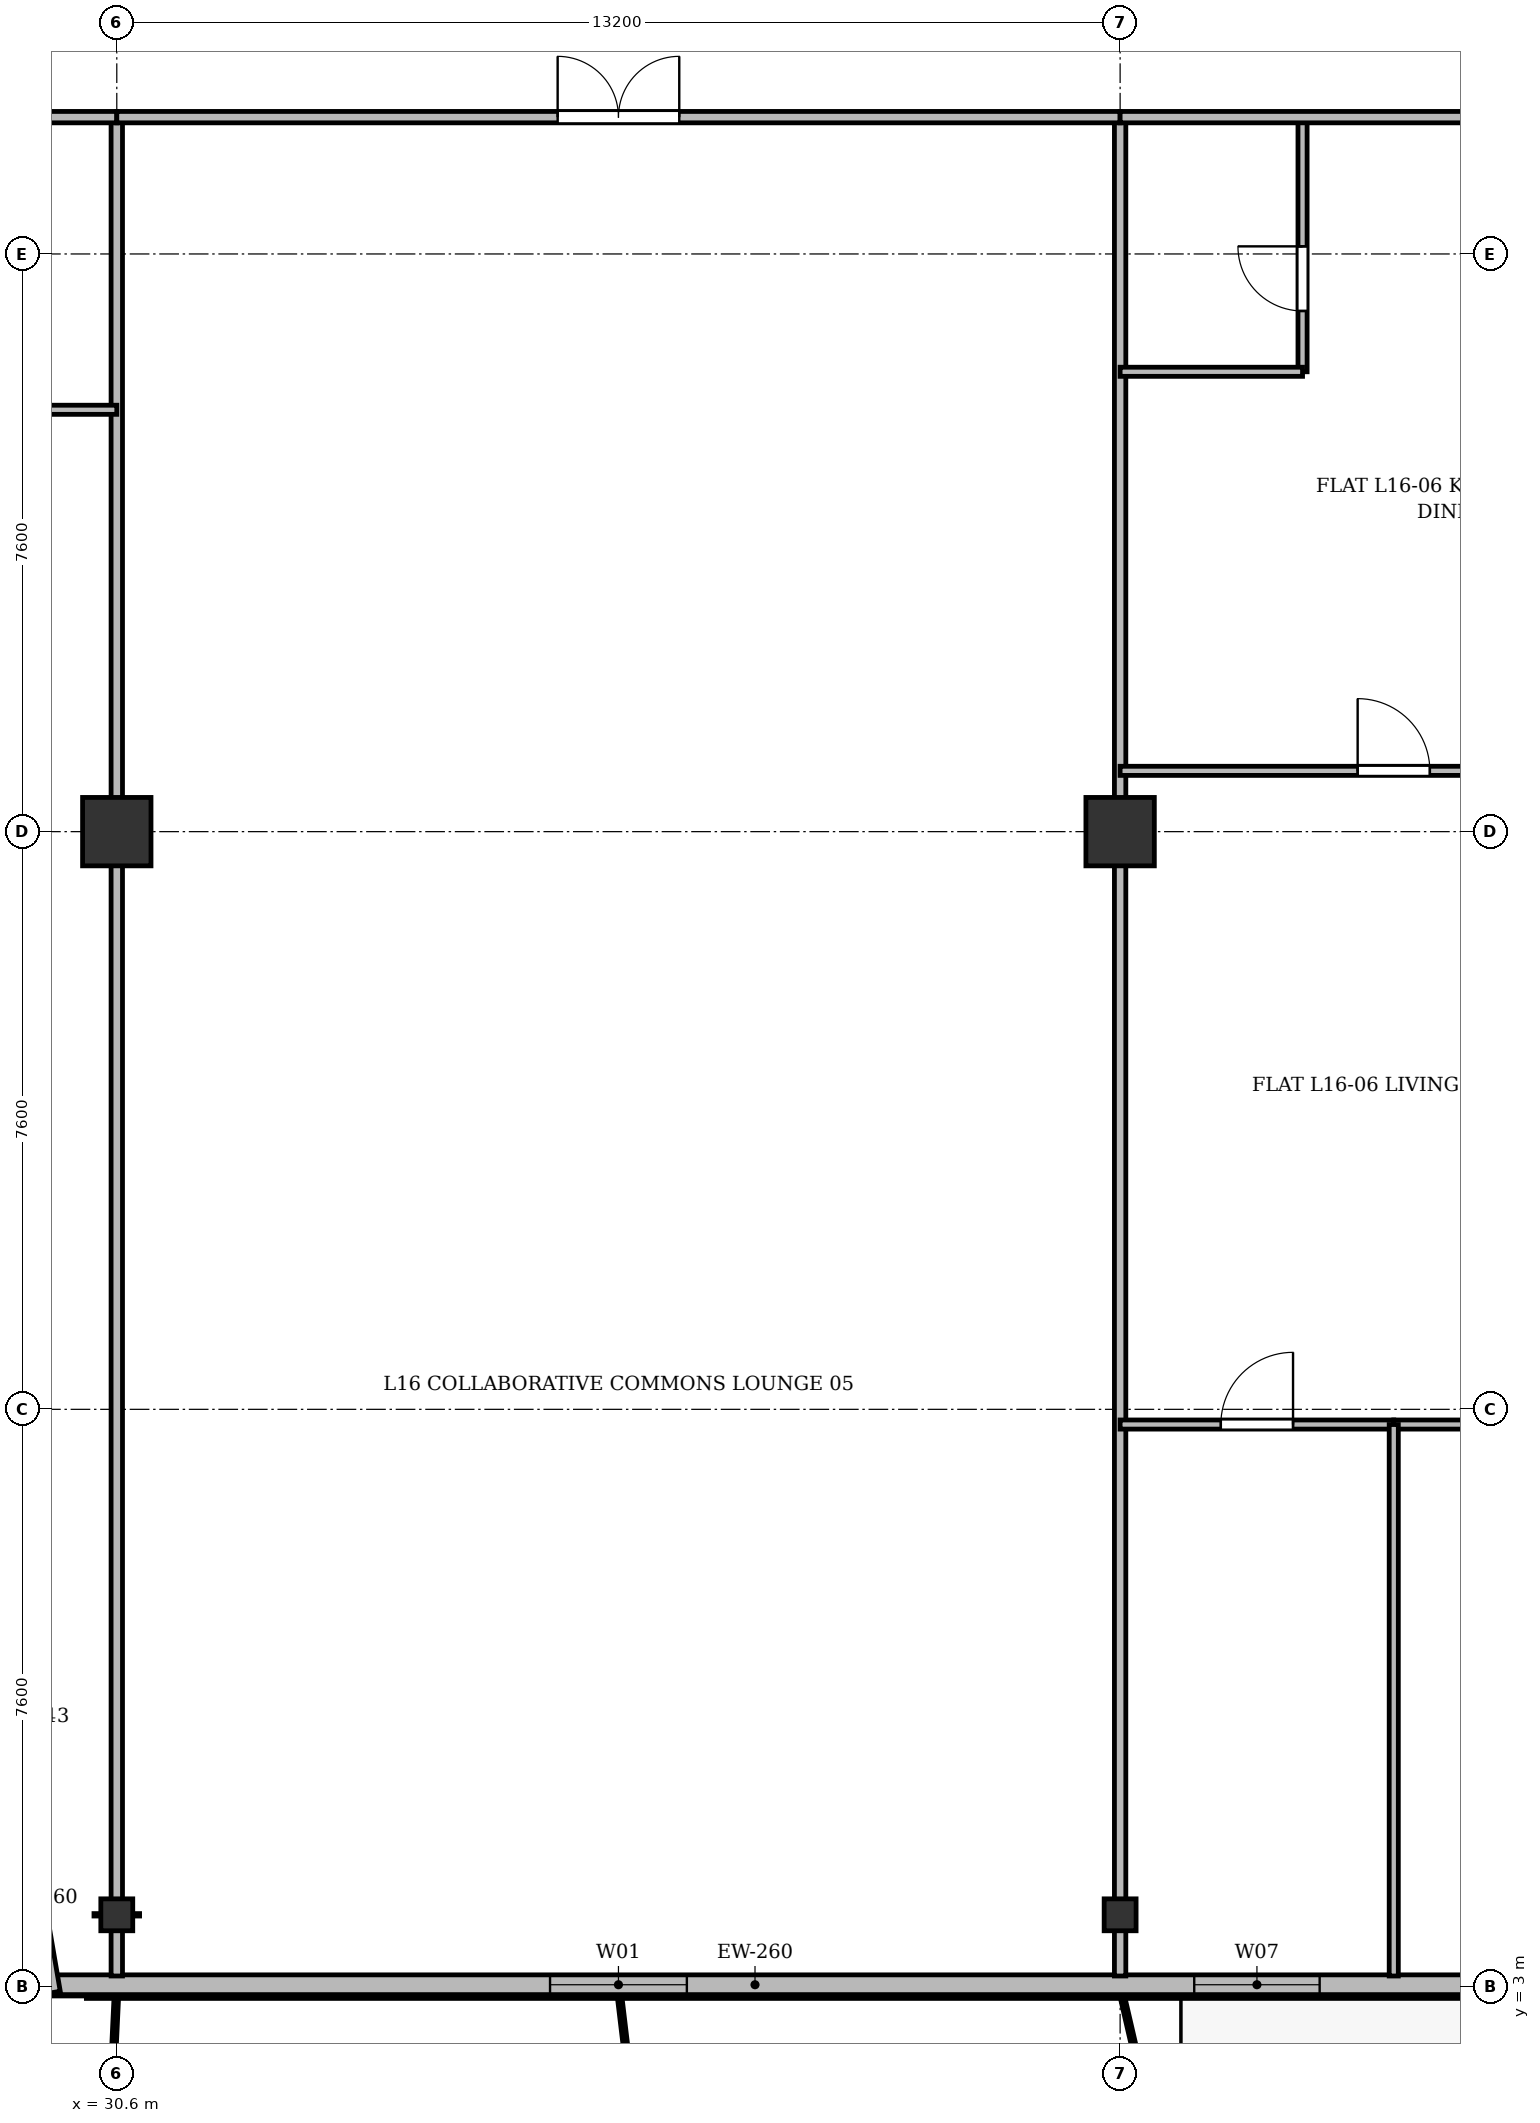
"""IFC4 building model, lengths in metres.
Left out: names, types, materials, properties, quantities, classifications, styles, units other than length and angle.
Written with IfcOpenShell. Run it as: python <this file> out.ifc"""

import sys

from ifc_helpers import new_model, si_unit, direction, frame, frame_2d, origin, origin_2d, place, context, subcontext, project, spatial, rectangle, i_section, extrude, source, transform, mapped, element, fill, save


model = new_model("IFC4")
c1 = context("Model", 3, precision=1e-05, world=origin(), true_north=direction((0.0, 1.0)))
c2 = subcontext(c1, "Body", "Model", "MODEL_VIEW")
j1 = project(units=[si_unit("LENGTHUNIT", "METRE"), si_unit("PLANEANGLEUNIT", "RADIAN")], contexts=[c1])
p1 = place(None, origin())
s1 = spatial("IfcSite", under=j1, at=p1, CompositionType="ELEMENT")
p2 = place(p1, origin())
s2 = spatial("IfcBuilding", under=s1, at=p2, CompositionType="ELEMENT")
p3 = place(p2, frame((0.0, 0.0, 63.1)))
s3 = spatial("IfcBuildingStorey", under=s2, at=p3, CompositionType="ELEMENT", Elevation=63.1)
m1 = source(origin(), c2, "Body", "SweptSolid", [
    extrude(i_section(OverallWidth=0.42, OverallDepth=0.42, WebThickness=0.026, FlangeThickness=0.04, at=origin_2d()), origin(), (0.0, 0.0, 1.0), 3.6),
])
p4 = place(p3, frame((30.6, 3.95, 0.0), z_axis=(0.0, 0.0, 1.0), x_axis=(1.0, 0.0, 0.0)))
e1 = element("IfcColumn", 1, at=p4, inside=s3, PredefinedType="COLUMN", context=c2, shape_type="MappedRepresentation", body=[
    mapped(m1, transform((0.0, 0.0, 0.0), x_axis=(1.0, 0.0, 0.0), y_axis=(0.0, 1.0, 0.0), z_axis=(0.0, 0.0, 1.0), scale=1.0)),
])
m2 = source(origin(), c2, "Body", "SweptSolid", [
    extrude(rectangle(XDim=0.9, YDim=0.9, at=origin_2d()), origin(), (0.0, 0.0, 1.0), 3.6),
])
p5 = place(p3, frame((30.6, 18.2, 0.0), z_axis=(0.0, 0.0, 1.0), x_axis=(1.0, 0.0, 0.0)))
e2 = element("IfcColumn", 2, at=p5, inside=s3, PredefinedType="COLUMN", context=c2, shape_type="MappedRepresentation", body=[
    mapped(m2, transform((0.0, 0.0, 0.0), x_axis=(1.0, 0.0, 0.0), y_axis=(0.0, 1.0, 0.0), z_axis=(0.0, 0.0, 1.0), scale=1.0)),
])
p6 = place(p3, frame((43.8, 3.95, 0.0), z_axis=(0.0, 0.0, 1.0), x_axis=(1.0, 0.0, 0.0)))
e3 = element("IfcColumn", 3, at=p6, inside=s3, PredefinedType="COLUMN", context=c2, shape_type="MappedRepresentation", body=[
    mapped(m1, transform((0.0, 0.0, 0.0), x_axis=(1.0, 0.0, 0.0), y_axis=(0.0, 1.0, 0.0), z_axis=(0.0, 0.0, 1.0), scale=1.0)),
])
p7 = place(p3, frame((43.8, 18.2, 0.0), z_axis=(0.0, 0.0, 1.0), x_axis=(1.0, 0.0, 0.0)))
e4 = element("IfcColumn", 4, at=p7, inside=s3, PredefinedType="COLUMN", context=c2, shape_type="MappedRepresentation", body=[
    mapped(m2, transform((0.0, 0.0, 0.0), x_axis=(1.0, 0.0, 0.0), y_axis=(0.0, 1.0, 0.0), z_axis=(0.0, 0.0, 1.0), scale=1.0)),
])
p8 = place(p3, frame((66.9, 3.03, 0.0), z_axis=(0.0, 0.0, 1.0), x_axis=(-1.0, 0.0, 0.0)))
e5 = element("IfcWall", 5, at=p8, inside=s3, PredefinedType="SOLIDWALL", context=c2, shape_type="SweptSolid", body=[
    extrude(rectangle(XDim=37.3, YDim=0.26, at=frame_2d((18.65, 0.0))), origin(), (0.0, 0.0, 1.0), 3.34),
])
p9 = place(p8, frame((2.995, 0.0, 0.9)))
e6 = element("IfcOpeningElement", 6, at=p9, cuts=e5, PredefinedType="OPENING", context=c2, shape_type="SweptSolid", body=[
    extrude(rectangle(XDim=2.2, YDim=1.8, at=frame_2d((1.1, 0.9))), frame((0.0, 0.14, 0.0), z_axis=(0.0, -1.0, 0.0), x_axis=(1.0, 0.0, 0.0)), (0.0, 0.0, 1.0), 0.28),
])
p10 = place(p8, frame((11.25, 0.0, 0.9)))
e7 = element("IfcOpeningElement", 7, at=p10, cuts=e5, PredefinedType="OPENING", context=c2, shape_type="SweptSolid", body=[
    extrude(rectangle(XDim=1.5, YDim=1.75, at=frame_2d((0.75, 0.875))), frame((0.0, 0.14, 0.0), z_axis=(0.0, -1.0, 0.0), x_axis=(1.0, 0.0, 0.0)), (0.0, 0.0, 1.0), 0.28),
])
p11 = place(p8, frame((17.007, 0.0, 0.0)))
e8 = element("IfcOpeningElement", 8, at=p11, cuts=e5, PredefinedType="OPENING", context=c2, shape_type="SweptSolid", body=[
    extrude(rectangle(XDim=1.2, YDim=2.2, at=frame_2d((0.6, 1.1))), frame((0.0, 0.14, 0.0), z_axis=(0.0, -1.0, 0.0), x_axis=(1.0, 0.0, 0.0)), (0.0, 0.0, 1.0), 0.28),
])
p12 = place(p8, frame((20.475, 0.0, 0.9)))
e9 = element("IfcOpeningElement", 9, at=p12, cuts=e5, PredefinedType="OPENING", context=c2, shape_type="SweptSolid", body=[
    extrude(rectangle(XDim=1.65, YDim=1.85, at=frame_2d((0.825, 0.925))), frame((0.0, 0.14, 0.0), z_axis=(0.0, -1.0, 0.0), x_axis=(1.0, 0.0, 0.0)), (0.0, 0.0, 1.0), 0.28),
])
p13 = place(p8, frame((28.8, 0.0, 0.9)))
e10 = element("IfcOpeningElement", 10, at=p13, cuts=e5, PredefinedType="OPENING", context=c2, shape_type="SweptSolid", body=[
    extrude(rectangle(XDim=1.8, YDim=1.8, at=frame_2d((0.9, 0.9))), frame((0.0, 0.14, 0.0), z_axis=(0.0, -1.0, 0.0), x_axis=(1.0, 0.0, 0.0)), (0.0, 0.0, 1.0), 0.28),
])
p14 = place(p3, frame((29.728, 2.922, 0.0), z_axis=(0.0, 0.0, 1.0), x_axis=(-0.168923741424, 0.98562912375, 0.0)))
e11 = element("IfcWall", 11, at=p14, inside=s3, PredefinedType="SOLIDWALL", context=c2, shape_type="SweptSolid", body=[
    extrude(rectangle(XDim=3.551, YDim=0.26, at=frame_2d((1.775, 0.0))), origin(), (0.0, 0.0, 1.0), 2.69),
])
p15 = place(p14, frame((1.971, 0.0, 0.0)))
e12 = element("IfcOpeningElement", 12, at=p15, cuts=e11, PredefinedType="OPENING", context=c2, shape_type="SweptSolid", body=[
    extrude(rectangle(XDim=1.2, YDim=2.2, at=frame_2d((0.6, 1.1))), frame((0.0, 0.14, 0.0), z_axis=(0.0, -1.0, 0.0), x_axis=(1.0, 0.0, 0.0)), (0.0, 0.0, 1.0), 0.28),
])
for number, where, z_axis, x_axis in (
    (13, (30.6, 3.145, 0.0), (0.0, 0.0, 1.0), (0.0, 1.0, 0.0)),
    (14, (43.8, 3.145, 0.0), (0.0, 0.0, 1.0), (0.0, 1.0, 0.0)),
):
    element("IfcWall", number, at=place(p3, frame(where, z_axis=z_axis, x_axis=x_axis)), inside=s3, PredefinedType="PARTITIONING", context=c2, shape_type="SweptSolid", body=[
        extrude(rectangle(XDim=24.455, YDim=0.15, at=frame_2d((12.228, 0.0))), origin(), (0.0, 0.0, 1.0), 2.752),
    ])
p16 = place(p3, frame((23.4, 27.6, 0.0), z_axis=(0.0, 0.0, 1.0), x_axis=(1.0, 0.0, 0.0)))
e15 = element("IfcWall", 15, at=p16, inside=s3, PredefinedType="PARTITIONING", context=c2, shape_type="SweptSolid", body=[
    extrude(rectangle(XDim=7.2, YDim=0.15, at=frame_2d((3.6, 0.0))), origin(), (0.0, 0.0, 1.0), 2.752),
])
p17 = place(p16, frame((3.125, 0.0, 0.0)))
e16 = element("IfcOpeningElement", 16, at=p17, cuts=e15, PredefinedType="OPENING", context=c2, shape_type="SweptSolid", body=[
    extrude(rectangle(XDim=0.95, YDim=2.15, at=frame_2d((0.475, 1.075))), frame((0.0, 0.085, 0.0), z_axis=(0.0, -1.0, 0.0), x_axis=(1.0, 0.0, 0.0)), (0.0, 0.0, 1.0), 0.17),
])
p18 = place(p3, frame((23.4, 23.75, 0.0), z_axis=(0.0, 0.0, 1.0), x_axis=(1.0, 0.0, 0.0)))
e17 = element("IfcWall", 17, at=p18, inside=s3, PredefinedType="PARTITIONING", context=c2, shape_type="SweptSolid", body=[
    extrude(rectangle(XDim=7.2, YDim=0.12, at=frame_2d((3.6, 0.0))), origin(), (0.0, 0.0, 1.0), 2.752),
])
p19 = place(p18, frame((3.125, 0.0, 0.0)))
e18 = element("IfcOpeningElement", 18, at=p19, cuts=e17, PredefinedType="OPENING", context=c2, shape_type="SweptSolid", body=[
    extrude(rectangle(XDim=0.95, YDim=2.15, at=frame_2d((0.475, 1.075))), frame((0.0, 0.07, 0.0), z_axis=(0.0, -1.0, 0.0), x_axis=(1.0, 0.0, 0.0)), (0.0, 0.0, 1.0), 0.14),
])
p20 = place(p3, frame((30.6, 27.6, 0.0), z_axis=(0.0, 0.0, 1.0), x_axis=(1.0, 0.0, 0.0)))
e19 = element("IfcWall", 19, at=p20, inside=s3, PredefinedType="PARTITIONING", context=c2, shape_type="SweptSolid", body=[
    extrude(rectangle(XDim=13.2, YDim=0.15, at=frame_2d((6.6, 0.0))), origin(), (0.0, 0.0, 1.0), 2.752),
])
p21 = place(p20, frame((5.8, 0.0, 0.0)))
e20 = element("IfcOpeningElement", 20, at=p21, cuts=e19, PredefinedType="OPENING", context=c2, shape_type="SweptSolid", body=[
    extrude(rectangle(XDim=1.6, YDim=2.2, at=frame_2d((0.8, 1.1))), frame((0.0, 0.085, 0.0), z_axis=(0.0, -1.0, 0.0), x_axis=(1.0, 0.0, 0.0)), (0.0, 0.0, 1.0), 0.17),
])
p22 = place(p3, frame((43.8, 19.0, 0.0), z_axis=(0.0, 0.0, 1.0), x_axis=(1.0, 0.0, 0.0)))
e21 = element("IfcWall", 21, at=p22, inside=s3, PredefinedType="PARTITIONING", context=c2, shape_type="SweptSolid", body=[
    extrude(rectangle(XDim=7.2, YDim=0.12, at=frame_2d((3.6, 0.0))), origin(), (0.0, 0.0, 1.0), 2.752),
])
p23 = place(p22, frame((3.125, 0.0, 0.0)))
e22 = element("IfcOpeningElement", 22, at=p23, cuts=e21, PredefinedType="OPENING", context=c2, shape_type="SweptSolid", body=[
    extrude(rectangle(XDim=0.95, YDim=2.15, at=frame_2d((0.475, 1.075))), frame((0.0, 0.07, 0.0), z_axis=(0.0, -1.0, 0.0), x_axis=(1.0, 0.0, 0.0)), (0.0, 0.0, 1.0), 0.14),
])
p24 = place(p3, frame((46.2, 24.25, 0.0), z_axis=(0.0, 0.0, 1.0), x_axis=(0.0, 1.0, 0.0)))
e23 = element("IfcWall", 23, at=p24, inside=s3, PredefinedType="PARTITIONING", context=c2, shape_type="SweptSolid", body=[
    extrude(rectangle(XDim=3.35, YDim=0.12, at=frame_2d((1.675, 0.0))), origin(), (0.0, 0.0, 1.0), 2.94),
])
p25 = place(p24, frame((0.8, 0.0, 0.0)))
e24 = element("IfcOpeningElement", 24, at=p25, cuts=e23, PredefinedType="OPENING", context=c2, shape_type="SweptSolid", body=[
    extrude(rectangle(XDim=0.85, YDim=2.1, at=frame_2d((0.425, 1.05))), frame((0.0, 0.07, 0.0), z_axis=(0.0, -1.0, 0.0), x_axis=(1.0, 0.0, 0.0)), (0.0, 0.0, 1.0), 0.14),
])
p26 = place(p3, frame((43.8, 24.25, 0.0), z_axis=(0.0, 0.0, 1.0), x_axis=(1.0, 0.0, 0.0)))
e25 = element("IfcWall", 25, at=p26, inside=s3, PredefinedType="PARTITIONING", context=c2, shape_type="SweptSolid", body=[
    extrude(rectangle(XDim=2.4, YDim=0.12, at=frame_2d((1.2, 0.0))), origin(), (0.0, 0.0, 1.0), 2.752),
])
p27 = place(p3, frame((43.8, 27.6, 0.0), z_axis=(0.0, 0.0, 1.0), x_axis=(1.0, 0.0, 0.0)))
e26 = element("IfcWall", 26, at=p27, inside=s3, PredefinedType="PARTITIONING", context=c2, shape_type="SweptSolid", body=[
    extrude(rectangle(XDim=7.2, YDim=0.15, at=frame_2d((3.6, 0.0))), origin(), (0.0, 0.0, 1.0), 2.752),
])
p28 = place(p27, frame((4.706, 0.0, 0.0)))
e27 = element("IfcOpeningElement", 27, at=p28, cuts=e26, PredefinedType="OPENING", context=c2, shape_type="SweptSolid", body=[
    extrude(rectangle(XDim=0.95, YDim=2.15, at=frame_2d((0.475, 1.075))), frame((0.0, 0.085, 0.0), z_axis=(0.0, -1.0, 0.0), x_axis=(1.0, 0.0, 0.0)), (0.0, 0.0, 1.0), 0.17),
])
p29 = place(p3, frame((43.8, 10.4, 0.0), z_axis=(0.0, 0.0, 1.0), x_axis=(1.0, 0.0, 0.0)))
e28 = element("IfcWall", 28, at=p29, inside=s3, PredefinedType="PARTITIONING", context=c2, shape_type="SweptSolid", body=[
    extrude(rectangle(XDim=3.6, YDim=0.12, at=frame_2d((1.8, 0.0))), origin(), (0.0, 0.0, 1.0), 2.752),
])
p30 = place(p29, frame((1.325, 0.0, 0.0)))
e29 = element("IfcOpeningElement", 29, at=p30, cuts=e28, PredefinedType="OPENING", context=c2, shape_type="SweptSolid", body=[
    extrude(rectangle(XDim=0.95, YDim=2.15, at=frame_2d((0.475, 1.075))), frame((0.0, 0.07, 0.0), z_axis=(0.0, -1.0, 0.0), x_axis=(1.0, 0.0, 0.0)), (0.0, 0.0, 1.0), 0.14),
])
p31 = place(p3, frame((47.4, 10.4, 0.0), z_axis=(0.0, 0.0, 1.0), x_axis=(1.0, 0.0, 0.0)))
e30 = element("IfcWall", 30, at=p31, inside=s3, PredefinedType="PARTITIONING", context=c2, shape_type="SweptSolid", body=[
    extrude(rectangle(XDim=3.6, YDim=0.12, at=frame_2d((1.8, 0.0))), origin(), (0.0, 0.0, 1.0), 2.752),
])
p32 = place(p31, frame((1.325, 0.0, 0.0)))
e31 = element("IfcOpeningElement", 31, at=p32, cuts=e30, PredefinedType="OPENING", context=c2, shape_type="SweptSolid", body=[
    extrude(rectangle(XDim=0.95, YDim=2.15, at=frame_2d((0.475, 1.075))), frame((0.0, 0.07, 0.0), z_axis=(0.0, -1.0, 0.0), x_axis=(1.0, 0.0, 0.0)), (0.0, 0.0, 1.0), 0.14),
])
p33 = place(p3, frame((47.4, 3.145, 0.0), z_axis=(0.0, 0.0, 1.0), x_axis=(0.0, 1.0, 0.0)))
e32 = element("IfcWall", 32, at=p33, inside=s3, PredefinedType="PARTITIONING", context=c2, shape_type="SweptSolid", body=[
    extrude(rectangle(XDim=7.255, YDim=0.12, at=frame_2d((3.627, 0.0))), origin(), (0.0, 0.0, 1.0), 2.69),
])
m3 = source(origin(), c2, "Body", "SweptSolid", [
    extrude(rectangle(XDim=1.65, YDim=1.85, at=frame_2d((0.825, 0.925))), frame((0.0, 0.03, 0.0), z_axis=(0.0, -1.0, 0.0), x_axis=(1.0, 0.0, 0.0)), (0.0, 0.0, 1.0), 0.06),
])
p34 = place(p12, origin())
e33 = element("IfcWindow", 33, at=p34, inside=s3, PartitioningType="SINGLE_PANEL", PredefinedType="WINDOW", context=c2, shape_type="MappedRepresentation", body=[
    mapped(m3, transform((0.0, 0.0, 0.0), x_axis=(1.0, 0.0, 0.0), y_axis=(0.0, 1.0, 0.0), z_axis=(0.0, 0.0, 1.0), scale=1.0)),
])
fill(e9, e33)
m4 = source(origin(), c2, "Body", "SweptSolid", [
    extrude(rectangle(XDim=1.8, YDim=1.8, at=frame_2d((0.9, 0.9))), frame((0.0, 0.03, 0.0), z_axis=(0.0, -1.0, 0.0), x_axis=(1.0, 0.0, 0.0)), (0.0, 0.0, 1.0), 0.06),
])
p35 = place(p13, origin())
e34 = element("IfcWindow", 34, at=p35, inside=s3, PartitioningType="SINGLE_PANEL", PredefinedType="WINDOW", context=c2, shape_type="MappedRepresentation", body=[
    mapped(m4, transform((0.0, 0.0, 0.0), x_axis=(1.0, 0.0, 0.0), y_axis=(0.0, 1.0, 0.0), z_axis=(0.0, 0.0, 1.0), scale=1.0)),
])
fill(e10, e34)
m5 = source(origin(), c2, "Body", "SweptSolid", [
    extrude(rectangle(XDim=1.6, YDim=2.2, at=frame_2d((0.8, 1.1))), frame((0.0, 0.025, 0.0), z_axis=(0.0, -1.0, 0.0), x_axis=(1.0, 0.0, 0.0)), (0.0, 0.0, 1.0), 0.05),
])
p36 = place(p21, origin())
e35 = element("IfcDoor", 35, at=p36, inside=s3, OperationType="DOUBLE_DOOR_SINGLE_SWING", PredefinedType="DOOR", context=c2, shape_type="MappedRepresentation", body=[
    mapped(m5, transform((0.0, 0.0, 0.0), x_axis=(1.0, 0.0, 0.0), y_axis=(0.0, 1.0, 0.0), z_axis=(0.0, 0.0, 1.0), scale=1.0)),
])
fill(e20, e35)
m6 = source(origin(), c2, "Body", "SweptSolid", [
    extrude(rectangle(XDim=0.95, YDim=2.15, at=frame_2d((0.475, 1.075))), frame((0.0, 0.025, 0.0), z_axis=(0.0, -1.0, 0.0), x_axis=(1.0, 0.0, 0.0)), (0.0, 0.0, 1.0), 0.05),
])
p37 = place(p23, origin())
e36 = element("IfcDoor", 36, at=p37, inside=s3, OperationType="SINGLE_SWING_LEFT", PredefinedType="DOOR", context=c2, shape_type="MappedRepresentation", body=[
    mapped(m6, transform((0.0, 0.0, 0.0), x_axis=(1.0, 0.0, 0.0), y_axis=(0.0, 1.0, 0.0), z_axis=(0.0, 0.0, 1.0), scale=1.0)),
])
fill(e22, e36)
m7 = source(origin(), c2, "Body", "SweptSolid", [
    extrude(rectangle(XDim=0.85, YDim=2.1, at=frame_2d((0.425, 1.05))), frame((0.0, 0.025, 0.0), z_axis=(0.0, -1.0, 0.0), x_axis=(1.0, 0.0, 0.0)), (0.0, 0.0, 1.0), 0.05),
])
p38 = place(p25, origin())
e37 = element("IfcDoor", 37, at=p38, inside=s3, OperationType="SINGLE_SWING_RIGHT", PredefinedType="DOOR", context=c2, shape_type="MappedRepresentation", body=[
    mapped(m7, transform((0.0, 0.0, 0.0), x_axis=(1.0, 0.0, 0.0), y_axis=(0.0, 1.0, 0.0), z_axis=(0.0, 0.0, 1.0), scale=1.0)),
])
fill(e24, e37)
p39 = place(p30, origin())
e38 = element("IfcDoor", 38, at=p39, inside=s3, OperationType="SINGLE_SWING_RIGHT", PredefinedType="DOOR", context=c2, shape_type="MappedRepresentation", body=[
    mapped(m6, transform((0.0, 0.0, 0.0), x_axis=(1.0, 0.0, 0.0), y_axis=(0.0, 1.0, 0.0), z_axis=(0.0, 0.0, 1.0), scale=1.0)),
])
fill(e29, e38)
save(model, sys.argv[1])
